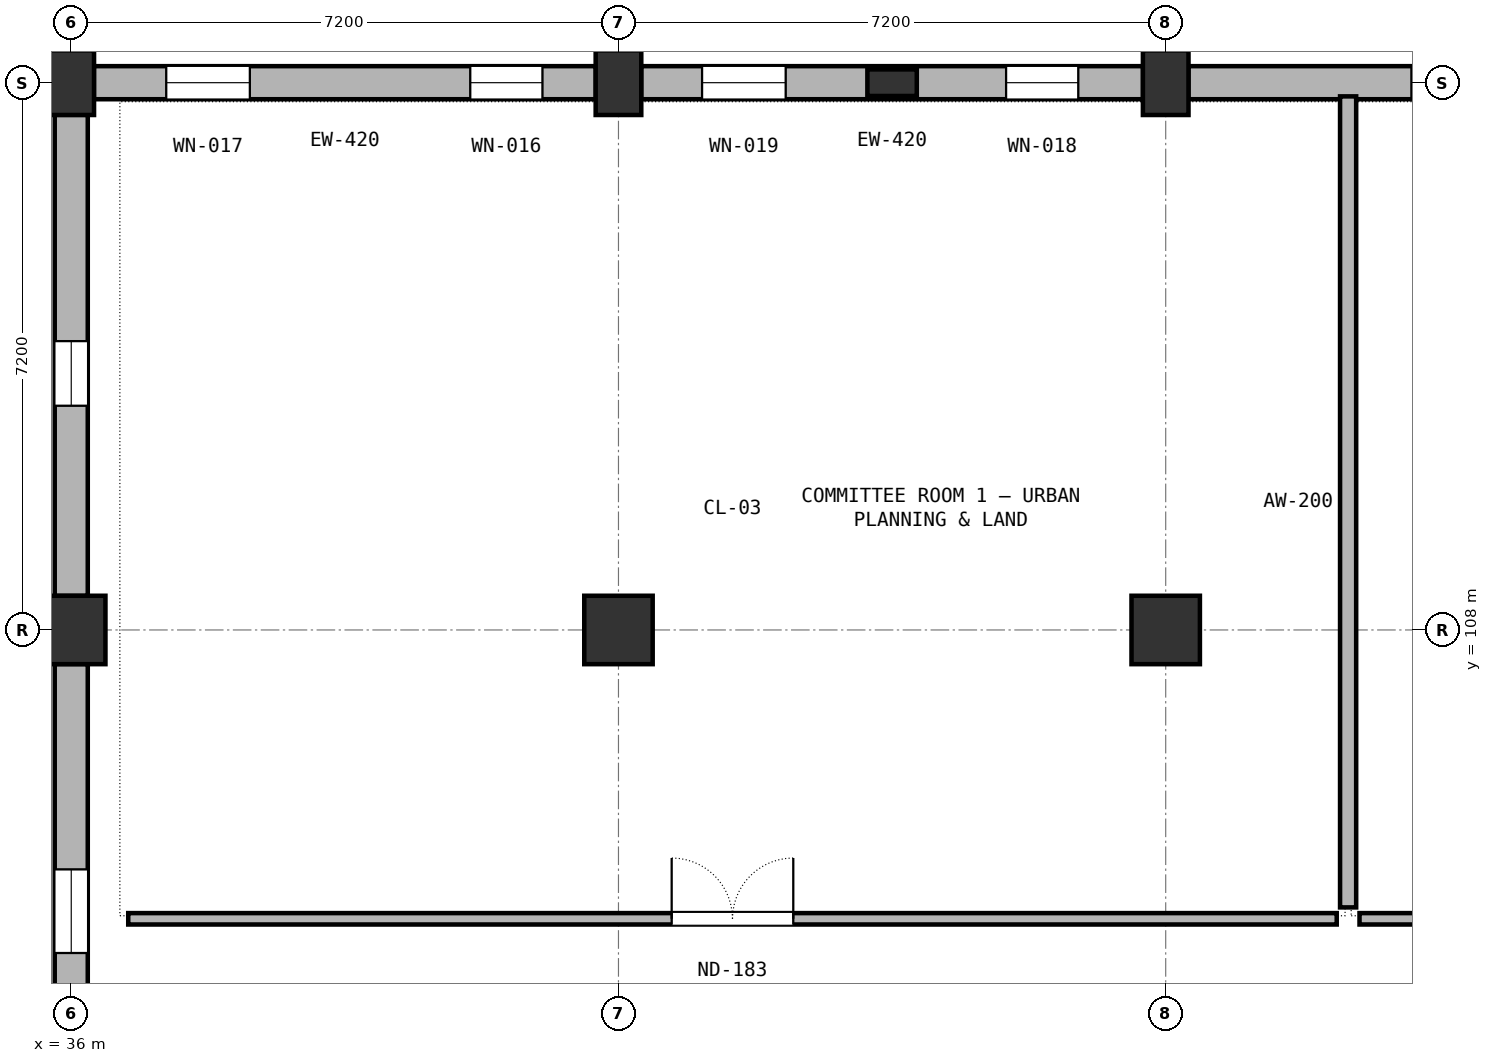
"""IFC4 building model, lengths in metres.
Left out: names, types, materials, properties, quantities, classifications, styles, units other than length and angle.
Written with IfcOpenShell. Run it as: python <this file> out.ifc"""

import sys

from ifc_helpers import new_model, si_unit, direction, frame, frame_2d, origin, origin_2d, place, context, subcontext, project, spatial, rectangle, extrude, element, fill, save


model = new_model("IFC4")
c1 = context("Model", 3, precision=1e-05, world=origin(), true_north=direction((0.0, 1.0)))
c2 = subcontext(c1, "Body", "Model", "MODEL_VIEW")
j1 = project(units=[si_unit("LENGTHUNIT", "METRE"), si_unit("PLANEANGLEUNIT", "RADIAN")], contexts=[c1])
p1 = place(None, origin())
s1 = spatial("IfcSite", under=j1, at=p1, CompositionType="ELEMENT")
p2 = place(p1, origin())
s2 = spatial("IfcBuilding", under=s1, at=p2, CompositionType="ELEMENT")
p3 = place(p2, frame((0.0, 0.0, 5.4)))
s3 = spatial("IfcBuildingStorey", under=s2, at=p3, CompositionType="ELEMENT", Elevation=5.4)
p4 = place(p3, frame((36.0, 108.0, 0.0), z_axis=(0.0, 0.0, 1.0), x_axis=(1.0, 0.0, 0.0)))
e1 = element("IfcColumn", 1, at=p4, inside=s3, PredefinedType="COLUMN", context=c2, shape_type="SweptSolid", body=[
    extrude(rectangle(XDim=0.9, YDim=0.9, at=origin_2d()), origin(), (0.0, 0.0, 1.0), 4.8),
])
p5 = place(p3, frame((36.0, 115.2, 0.0), z_axis=(0.0, 0.0, 1.0), x_axis=(1.0, 0.0, 0.0)))
e2 = element("IfcColumn", 2, at=p5, inside=s3, PredefinedType="COLUMN", context=c2, shape_type="SweptSolid", body=[
    extrude(rectangle(XDim=0.6, YDim=0.85, at=origin_2d()), origin(), (0.0, 0.0, 1.0), 4.8),
])
p6 = place(p3, frame((43.2, 108.0, 0.0), z_axis=(0.0, 0.0, 1.0), x_axis=(1.0, 0.0, 0.0)))
e3 = element("IfcColumn", 3, at=p6, inside=s3, PredefinedType="COLUMN", context=c2, shape_type="SweptSolid", body=[
    extrude(rectangle(XDim=0.9, YDim=0.9, at=origin_2d()), origin(), (0.0, 0.0, 1.0), 4.8),
])
p7 = place(p3, frame((43.2, 115.2, 0.0), z_axis=(0.0, 0.0, 1.0), x_axis=(1.0, 0.0, 0.0)))
e4 = element("IfcColumn", 4, at=p7, inside=s3, PredefinedType="COLUMN", context=c2, shape_type="SweptSolid", body=[
    extrude(rectangle(XDim=0.6, YDim=0.85, at=origin_2d()), origin(), (0.0, 0.0, 1.0), 4.8),
])
p8 = place(p3, frame((50.4, 108.0, 0.0), z_axis=(0.0, 0.0, 1.0), x_axis=(1.0, 0.0, 0.0)))
e5 = element("IfcColumn", 5, at=p8, inside=s3, PredefinedType="COLUMN", context=c2, shape_type="SweptSolid", body=[
    extrude(rectangle(XDim=0.9, YDim=0.9, at=origin_2d()), origin(), (0.0, 0.0, 1.0), 4.8),
])
p9 = place(p3, frame((50.4, 115.2, 0.0), z_axis=(0.0, 0.0, 1.0), x_axis=(1.0, 0.0, 0.0)))
e6 = element("IfcColumn", 6, at=p9, inside=s3, PredefinedType="COLUMN", context=c2, shape_type="SweptSolid", body=[
    extrude(rectangle(XDim=0.6, YDim=0.85, at=origin_2d()), origin(), (0.0, 0.0, 1.0), 4.8),
])
p10 = place(p3, frame((46.8, 115.2, 0.0), z_axis=(0.0, 0.0, 1.0), x_axis=(1.0, 0.0, 0.0)))
e7 = element("IfcColumn", 7, at=p10, inside=s3, PredefinedType="PILASTER", context=c2, shape_type="SweptSolid", body=[
    extrude(rectangle(XDim=0.65, YDim=0.35, at=origin_2d()), origin(), (0.0, 0.0, 1.0), 4.8),
])
p11 = place(p3, frame((42.902, 115.2, 0.0), z_axis=(0.0, 0.0, 1.0), x_axis=(-1.0, 0.0, 0.0)))
e8 = element("IfcWall", 8, at=p11, inside=s3, PredefinedType="SOLIDWALL", context=c2, shape_type="SweptSolid", body=[
    extrude(rectangle(XDim=6.604, YDim=0.435, at=frame_2d((3.302, 0.0))), origin(), (0.0, 0.0, 1.0), 3.5),
])
p12 = place(p11, frame((0.702, 0.0, 0.7)))
e9 = element("IfcOpeningElement", 9, at=p12, cuts=e8, PredefinedType="OPENING", context=c2, shape_type="SweptSolid", body=[
    extrude(rectangle(XDim=0.95, YDim=2.6, at=frame_2d((0.475, 1.3))), frame((0.0, 0.228, 0.0), z_axis=(0.0, -1.0, 0.0), x_axis=(1.0, 0.0, 0.0)), (0.0, 0.0, 1.0), 0.455),
])
p13 = place(p11, frame((4.552, 0.0, 0.7)))
e10 = element("IfcOpeningElement", 10, at=p13, cuts=e8, PredefinedType="OPENING", context=c2, shape_type="SweptSolid", body=[
    extrude(rectangle(XDim=1.1, YDim=2.6, at=frame_2d((0.55, 1.3))), frame((0.0, 0.228, 0.0), z_axis=(0.0, -1.0, 0.0), x_axis=(1.0, 0.0, 0.0)), (0.0, 0.0, 1.0), 0.455),
])
p14 = place(p3, frame((50.102, 115.2, 0.0), z_axis=(0.0, 0.0, 1.0), x_axis=(-1.0, 0.0, 0.0)))
e11 = element("IfcWall", 11, at=p14, inside=s3, PredefinedType="SOLIDWALL", context=c2, shape_type="SweptSolid", body=[
    extrude(rectangle(XDim=6.604, YDim=0.435, at=frame_2d((3.302, 0.0))), origin(), (0.0, 0.0, 1.0), 3.5),
])
p15 = place(p14, frame((0.852, 0.0, 0.7)))
e12 = element("IfcOpeningElement", 12, at=p15, cuts=e11, PredefinedType="OPENING", context=c2, shape_type="SweptSolid", body=[
    extrude(rectangle(XDim=0.95, YDim=2.6, at=frame_2d((0.475, 1.3))), frame((0.0, 0.228, 0.0), z_axis=(0.0, -1.0, 0.0), x_axis=(1.0, 0.0, 0.0)), (0.0, 0.0, 1.0), 0.455),
])
p16 = place(p14, frame((4.702, 0.0, 0.7)))
e13 = element("IfcOpeningElement", 13, at=p16, cuts=e11, PredefinedType="OPENING", context=c2, shape_type="SweptSolid", body=[
    extrude(rectangle(XDim=1.1, YDim=2.6, at=frame_2d((0.55, 1.3))), frame((0.0, 0.228, 0.0), z_axis=(0.0, -1.0, 0.0), x_axis=(1.0, 0.0, 0.0)), (0.0, 0.0, 1.0), 0.455),
])
p17 = place(p3, frame((57.302, 115.2, 0.0), z_axis=(0.0, 0.0, 1.0), x_axis=(-1.0, 0.0, 0.0)))
e14 = element("IfcWall", 14, at=p17, inside=s3, PredefinedType="SOLIDWALL", context=c2, shape_type="SweptSolid", body=[
    extrude(rectangle(XDim=6.604, YDim=0.435, at=frame_2d((3.302, 0.0))), origin(), (0.0, 0.0, 1.0), 3.5),
])
p18 = place(p17, frame((0.702, 0.0, 0.7)))
e15 = element("IfcOpeningElement", 15, at=p18, cuts=e14, PredefinedType="OPENING", context=c2, shape_type="SweptSolid", body=[
    extrude(rectangle(XDim=0.95, YDim=2.6, at=frame_2d((0.475, 1.3))), frame((0.0, 0.228, 0.0), z_axis=(0.0, -1.0, 0.0), x_axis=(1.0, 0.0, 0.0)), (0.0, 0.0, 1.0), 0.455),
])
p19 = place(p17, frame((2.569, 0.0, 0.7)))
e16 = element("IfcOpeningElement", 16, at=p19, cuts=e14, PredefinedType="OPENING", context=c2, shape_type="SweptSolid", body=[
    extrude(rectangle(XDim=1.1, YDim=2.6, at=frame_2d((0.55, 1.3))), frame((0.0, 0.228, 0.0), z_axis=(0.0, -1.0, 0.0), x_axis=(1.0, 0.0, 0.0)), (0.0, 0.0, 1.0), 0.455),
])
p20 = place(p3, frame((36.0, 101.248, 0.0), z_axis=(0.0, 0.0, 1.0), x_axis=(0.0, 1.0, 0.0)))
e17 = element("IfcWall", 17, at=p20, inside=s3, PredefinedType="SOLIDWALL", context=c2, shape_type="SweptSolid", body=[
    extrude(rectangle(XDim=6.304, YDim=0.435, at=frame_2d((3.152, 0.0))), origin(), (0.0, 0.0, 1.0), 3.5),
])
p21 = place(p20, frame((2.502, 0.0, 0.7)))
e18 = element("IfcOpeningElement", 18, at=p21, cuts=e17, PredefinedType="OPENING", context=c2, shape_type="SweptSolid", body=[
    extrude(rectangle(XDim=1.1, YDim=2.35, at=frame_2d((0.55, 1.175))), frame((0.0, 0.228, 0.0), z_axis=(0.0, -1.0, 0.0), x_axis=(1.0, 0.0, 0.0)), (0.0, 0.0, 1.0), 0.455),
])
p22 = place(p3, frame((36.0, 108.448, 0.0), z_axis=(0.0, 0.0, 1.0), x_axis=(0.0, 1.0, 0.0)))
e19 = element("IfcWall", 19, at=p22, inside=s3, PredefinedType="SOLIDWALL", context=c2, shape_type="SweptSolid", body=[
    extrude(rectangle(XDim=6.329, YDim=0.435, at=frame_2d((3.165, 0.0))), origin(), (0.0, 0.0, 1.0), 3.5),
])
p23 = place(p22, frame((2.502, 0.0, 0.7)))
e20 = element("IfcOpeningElement", 20, at=p23, cuts=e19, PredefinedType="OPENING", context=c2, shape_type="SweptSolid", body=[
    extrude(rectangle(XDim=0.85, YDim=2.2, at=frame_2d((0.425, 1.1))), frame((0.0, 0.228, 0.0), z_axis=(0.0, -1.0, 0.0), x_axis=(1.0, 0.0, 0.0)), (0.0, 0.0, 1.0), 0.455),
])
p24 = place(p3, frame((36.75, 104.2, 0.0), z_axis=(0.0, 0.0, 1.0), x_axis=(1.0, 0.0, 0.0)))
e21 = element("IfcWall", 21, at=p24, inside=s3, PredefinedType="PARTITIONING", context=c2, shape_type="SweptSolid", body=[
    extrude(rectangle(XDim=15.9, YDim=0.15, at=frame_2d((7.95, 0.0))), origin(), (0.0, 0.0, 1.0), 3.52),
])
p25 = place(p24, frame((7.15, 0.0, 0.0)))
e22 = element("IfcOpeningElement", 22, at=p25, cuts=e21, PredefinedType="OPENING", context=c2, shape_type="SweptSolid", body=[
    extrude(rectangle(XDim=1.6, YDim=2.2, at=frame_2d((0.8, 1.1))), frame((0.0, 0.085, 0.0), z_axis=(0.0, -1.0, 0.0), x_axis=(1.0, 0.0, 0.0)), (0.0, 0.0, 1.0), 0.17),
])
p26 = place(p3, frame((52.95, 104.2, 0.0), z_axis=(0.0, 0.0, 1.0), x_axis=(1.0, 0.0, 0.0)))
e23 = element("IfcWall", 23, at=p26, inside=s3, PredefinedType="PARTITIONING", context=c2, shape_type="SweptSolid", body=[
    extrude(rectangle(XDim=15.9, YDim=0.15, at=frame_2d((7.95, 0.0))), origin(), (0.0, 0.0, 1.0), 3.52),
])
p27 = place(p26, frame((7.25, 0.0, 0.0)))
e24 = element("IfcOpeningElement", 24, at=p27, cuts=e23, PredefinedType="OPENING", context=c2, shape_type="SweptSolid", body=[
    extrude(rectangle(XDim=1.4, YDim=2.2, at=frame_2d((0.7, 1.1))), frame((0.0, 0.085, 0.0), z_axis=(0.0, -1.0, 0.0), x_axis=(1.0, 0.0, 0.0)), (0.0, 0.0, 1.0), 0.17),
])
p28 = place(p3, frame((52.8, 104.35, 0.0), z_axis=(0.0, 0.0, 1.0), x_axis=(0.0, 1.0, 0.0)))
e25 = element("IfcWall", 25, at=p28, inside=s3, PredefinedType="PARTITIONING", context=c2, shape_type="SweptSolid", body=[
    extrude(rectangle(XDim=10.67, YDim=0.212, at=frame_2d((5.335, 0.0))), origin(), (0.0, 0.0, 1.0), 3.52),
])
p29 = place(p12, origin())
e26 = element("IfcWindow", 26, at=p29, inside=s3, PartitioningType="SINGLE_PANEL", PredefinedType="WINDOW", context=c2, shape_type="SweptSolid", body=[
    extrude(rectangle(XDim=0.95, YDim=2.6, at=frame_2d((0.475, 1.3))), frame((0.0, 0.03, 0.0), z_axis=(0.0, -1.0, 0.0), x_axis=(1.0, 0.0, 0.0)), (0.0, 0.0, 1.0), 0.06),
])
fill(e9, e26)
p30 = place(p13, origin())
e27 = element("IfcWindow", 27, at=p30, inside=s3, PartitioningType="SINGLE_PANEL", PredefinedType="WINDOW", context=c2, shape_type="SweptSolid", body=[
    extrude(rectangle(XDim=1.1, YDim=2.6, at=frame_2d((0.55, 1.3))), frame((0.0, 0.03, 0.0), z_axis=(0.0, -1.0, 0.0), x_axis=(1.0, 0.0, 0.0)), (0.0, 0.0, 1.0), 0.06),
])
fill(e10, e27)
p31 = place(p15, origin())
e28 = element("IfcWindow", 28, at=p31, inside=s3, PartitioningType="SINGLE_PANEL", PredefinedType="WINDOW", context=c2, shape_type="SweptSolid", body=[
    extrude(rectangle(XDim=0.95, YDim=2.6, at=frame_2d((0.475, 1.3))), frame((0.0, 0.03, 0.0), z_axis=(0.0, -1.0, 0.0), x_axis=(1.0, 0.0, 0.0)), (0.0, 0.0, 1.0), 0.06),
])
fill(e12, e28)
p32 = place(p16, origin())
e29 = element("IfcWindow", 29, at=p32, inside=s3, PartitioningType="SINGLE_PANEL", PredefinedType="WINDOW", context=c2, shape_type="SweptSolid", body=[
    extrude(rectangle(XDim=1.1, YDim=2.6, at=frame_2d((0.55, 1.3))), frame((0.0, 0.03, 0.0), z_axis=(0.0, -1.0, 0.0), x_axis=(1.0, 0.0, 0.0)), (0.0, 0.0, 1.0), 0.06),
])
fill(e13, e29)
p33 = place(p19, origin())
e30 = element("IfcWindow", 30, at=p33, inside=s3, PartitioningType="SINGLE_PANEL", PredefinedType="WINDOW", context=c2, shape_type="SweptSolid", body=[
    extrude(rectangle(XDim=1.1, YDim=2.6, at=frame_2d((0.55, 1.3))), frame((0.0, 0.03, 0.0), z_axis=(0.0, -1.0, 0.0), x_axis=(1.0, 0.0, 0.0)), (0.0, 0.0, 1.0), 0.06),
])
fill(e16, e30)
p34 = place(p21, origin())
e31 = element("IfcWindow", 31, at=p34, inside=s3, PartitioningType="SINGLE_PANEL", PredefinedType="WINDOW", context=c2, shape_type="SweptSolid", body=[
    extrude(rectangle(XDim=1.1, YDim=2.35, at=frame_2d((0.55, 1.175))), frame((0.0, 0.03, 0.0), z_axis=(0.0, -1.0, 0.0), x_axis=(1.0, 0.0, 0.0)), (0.0, 0.0, 1.0), 0.06),
])
fill(e18, e31)
p35 = place(p23, origin())
e32 = element("IfcWindow", 32, at=p35, inside=s3, PartitioningType="SINGLE_PANEL", PredefinedType="WINDOW", context=c2, shape_type="SweptSolid", body=[
    extrude(rectangle(XDim=0.85, YDim=2.2, at=frame_2d((0.425, 1.1))), frame((0.0, 0.03, 0.0), z_axis=(0.0, -1.0, 0.0), x_axis=(1.0, 0.0, 0.0)), (0.0, 0.0, 1.0), 0.06),
])
fill(e20, e32)
p36 = place(p25, origin())
e33 = element("IfcDoor", 33, at=p36, inside=s3, OperationType="DOUBLE_DOOR_SINGLE_SWING", PredefinedType="DOOR", context=c2, shape_type="SweptSolid", body=[
    extrude(rectangle(XDim=1.6, YDim=2.2, at=frame_2d((0.8, 1.1))), frame((0.0, 0.025, 0.0), z_axis=(0.0, -1.0, 0.0), x_axis=(1.0, 0.0, 0.0)), (0.0, 0.0, 1.0), 0.05),
])
fill(e22, e33)
save(model, sys.argv[1])
